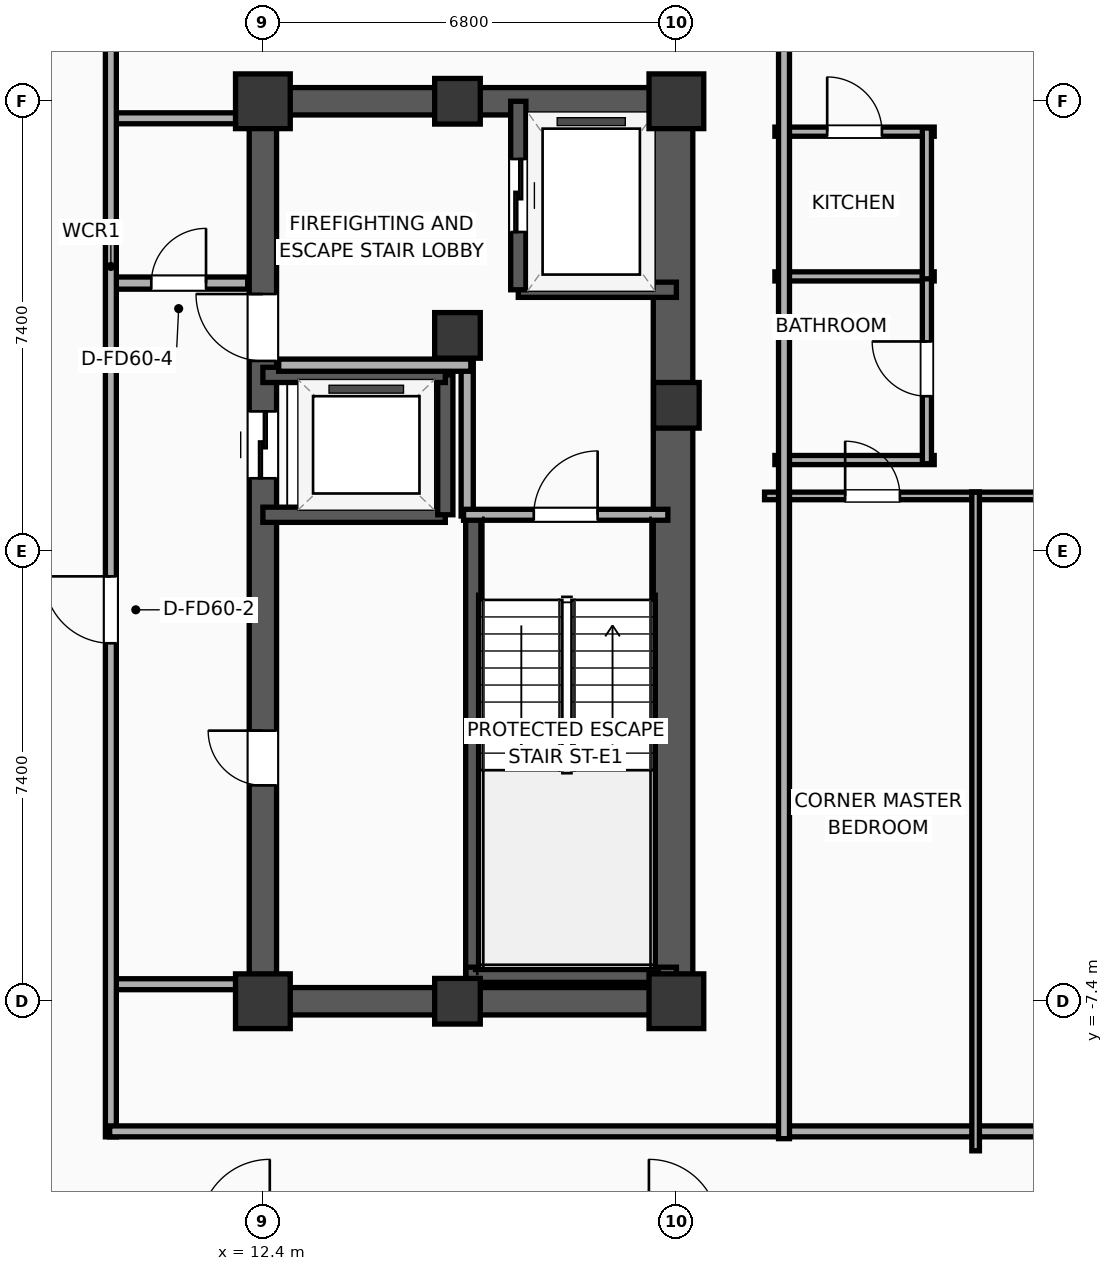
"""IFC4 building model, lengths in metres.
Left out: names, types, materials, properties, quantities, classifications, styles, units other than length and angle.
Written with IfcOpenShell. Run it as: python <this file> out.ifc"""

import sys

from ifc_helpers import new_model, si_unit, direction, frame, frame_2d, origin, origin_2d, place, context, subcontext, project, spatial, rectangle, extrude, element, fill, save


model = new_model("IFC4")
c1 = context("Model", 3, precision=1e-05, world=origin(), true_north=direction((0.0, 1.0)))
c2 = subcontext(c1, "Body", "Model", "MODEL_VIEW")
j1 = project(units=[si_unit("LENGTHUNIT", "METRE"), si_unit("PLANEANGLEUNIT", "RADIAN")], contexts=[c1])
p1 = place(None, origin())
s1 = spatial("IfcSite", under=j1, at=p1, CompositionType="ELEMENT")
p2 = place(p1, origin())
s2 = spatial("IfcBuilding", under=s1, at=p2, CompositionType="ELEMENT")
p3 = place(p2, frame((0.0, 0.0, 231.4)))
s3 = spatial("IfcBuildingStorey", under=s2, at=p3, CompositionType="ELEMENT", Elevation=231.4)
p4 = place(p3, frame((12.4, -7.4, 0.0), z_axis=(0.0, 0.0, 1.0), x_axis=(1.0, 0.0, 0.0)))
e1 = element("IfcColumn", 1, at=p4, inside=s3, PredefinedType="COLUMN", context=c2, shape_type="SweptSolid", body=[
    extrude(rectangle(XDim=0.9, YDim=0.9, at=origin_2d()), origin(), (0.0, 0.0, 1.0), 3.9),
])
p5 = place(p3, frame((15.6, 3.55, 0.0), z_axis=(0.0, 0.0, 1.0), x_axis=(1.0, 0.0, 0.0)))
e2 = element("IfcColumn", 2, at=p5, inside=s3, PredefinedType="COLUMN", context=c2, shape_type="SweptSolid", body=[
    extrude(rectangle(XDim=0.75, YDim=0.75, at=origin_2d()), origin(), (0.0, 0.0, 1.0), 3.9),
])
p6 = place(p3, frame((12.4, 7.4, 0.0), z_axis=(0.0, 0.0, 1.0), x_axis=(1.0, 0.0, 0.0)))
e3 = element("IfcColumn", 3, at=p6, inside=s3, PredefinedType="COLUMN", context=c2, shape_type="SweptSolid", body=[
    extrude(rectangle(XDim=0.9, YDim=0.9, at=origin_2d()), origin(), (0.0, 0.0, 1.0), 3.9),
])
for number, where, z_axis, x_axis in (
    (4, (15.6, -7.4, 0.0), (0.0, 0.0, 1.0), (1.0, 0.0, 0.0)),
    (5, (15.6, 7.4, 0.0), (0.0, 0.0, 1.0), (1.0, 0.0, 0.0)),
):
    element("IfcColumn", number, at=place(p3, frame(where, z_axis=z_axis, x_axis=x_axis)), inside=s3, PredefinedType="COLUMN", context=c2, shape_type="SweptSolid", body=[
        extrude(rectangle(XDim=0.75, YDim=0.75, at=origin_2d()), origin(), (0.0, 0.0, 1.0), 3.9),
    ])
p7 = place(p3, frame((19.2, -7.4, 0.0), z_axis=(0.0, 0.0, 1.0), x_axis=(1.0, 0.0, 0.0)))
e6 = element("IfcColumn", 6, at=p7, inside=s3, PredefinedType="COLUMN", context=c2, shape_type="SweptSolid", body=[
    extrude(rectangle(XDim=0.9, YDim=0.9, at=origin_2d()), origin(), (0.0, 0.0, 1.0), 3.9),
])
p8 = place(p3, frame((19.2, 2.4, 0.0), z_axis=(0.0, 0.0, 1.0), x_axis=(1.0, 0.0, 0.0)))
e7 = element("IfcColumn", 7, at=p8, inside=s3, PredefinedType="COLUMN", context=c2, shape_type="SweptSolid", body=[
    extrude(rectangle(XDim=0.75, YDim=0.75, at=origin_2d()), origin(), (0.0, 0.0, 1.0), 3.9),
])
p9 = place(p3, frame((19.2, 7.4, 0.0), z_axis=(0.0, 0.0, 1.0), x_axis=(1.0, 0.0, 0.0)))
e8 = element("IfcColumn", 8, at=p9, inside=s3, PredefinedType="COLUMN", context=c2, shape_type="SweptSolid", body=[
    extrude(rectangle(XDim=0.9, YDim=0.9, at=origin_2d()), origin(), (0.0, 0.0, 1.0), 3.9),
])
for number, where, z_axis, x_axis in (
    (9, (12.175, -7.4, 0.0), (0.0, 0.0, 1.0), (1.0, 0.0, 0.0)),
    (10, (12.175, 7.4, 0.0), (0.0, 0.0, 1.0), (1.0, 0.0, 0.0)),
):
    element("IfcWall", number, at=place(p3, frame(where, z_axis=z_axis, x_axis=x_axis)), inside=s3, PredefinedType="SHEAR", context=c2, shape_type="SweptSolid", body=[
        extrude(rectangle(XDim=7.25, YDim=0.45, at=frame_2d((3.625, 0.0))), origin(), (0.0, 0.0, 1.0), 3.65),
    ])
p10 = place(p3, frame((12.4, -7.4, 0.0), z_axis=(0.0, 0.0, 1.0), x_axis=(0.0, 1.0, 0.0)))
e11 = element("IfcWall", 11, at=p10, inside=s3, PredefinedType="SHEAR", context=c2, shape_type="SweptSolid", body=[
    extrude(rectangle(XDim=14.8, YDim=0.45, at=frame_2d((7.4, 0.0))), origin(), (0.0, 0.0, 1.0), 3.65),
])
p11 = place(p10, frame((8.6, 0.0, 0.0)))
e12 = element("IfcOpeningElement", 12, at=p11, cuts=e11, PredefinedType="OPENING", context=c2, shape_type="SweptSolid", body=[
    extrude(rectangle(XDim=1.1, YDim=2.05, at=frame_2d((0.55, 1.025))), frame((0.0, 0.235, 0.0), z_axis=(0.0, -1.0, 0.0), x_axis=(1.0, 0.0, 0.0)), (0.0, 0.0, 1.0), 0.47),
])
p12 = place(p10, frame((10.53, 0.0, 0.0)))
e13 = element("IfcOpeningElement", 13, at=p12, cuts=e11, PredefinedType="OPENING", context=c2, shape_type="SweptSolid", body=[
    extrude(rectangle(XDim=1.1, YDim=2.05, at=frame_2d((0.55, 1.025))), frame((0.0, 0.235, 0.0), z_axis=(0.0, -1.0, 0.0), x_axis=(1.0, 0.0, 0.0)), (0.0, 0.0, 1.0), 0.47),
])
p13 = place(p10, frame((3.55, 0.0, 0.0)))
e14 = element("IfcOpeningElement", 14, at=p13, cuts=e11, PredefinedType="OPENING", context=c2, shape_type="SweptSolid", body=[
    extrude(rectangle(XDim=0.9, YDim=2.05, at=frame_2d((0.45, 1.025))), frame((0.0, 0.235, 0.0), z_axis=(0.0, -1.0, 0.0), x_axis=(1.0, 0.0, 0.0)), (0.0, 0.0, 1.0), 0.47),
])
p14 = place(p3, frame((19.145, -7.4, 0.0), z_axis=(0.0, 0.0, 1.0), x_axis=(0.0, 1.0, 0.0)))
e15 = element("IfcWall", 15, at=p14, inside=s3, PredefinedType="SHEAR", context=c2, shape_type="SweptSolid", body=[
    extrude(rectangle(XDim=14.8, YDim=0.65, at=frame_2d((7.4, 0.0))), origin(), (0.0, 0.0, 1.0), 3.65),
])
p15 = place(p3, frame((15.86, -7.085, 0.0), z_axis=(0.0, 0.0, 1.0), x_axis=(0.0, 1.0, 0.0)))
e16 = element("IfcWall", 16, at=p15, inside=s3, PredefinedType="SOLIDWALL", context=c2, shape_type="SweptSolid", body=[
    extrude(rectangle(XDim=7.685, YDim=0.25, at=frame_2d((3.843, 0.0))), origin(), (0.0, 0.0, 1.0), 3.65),
])
p16 = place(p3, frame((15.74, -6.965, 0.0), z_axis=(0.0, 0.0, 1.0), x_axis=(1.0, 0.0, 0.0)))
e17 = element("IfcWall", 17, at=p16, inside=s3, PredefinedType="SOLIDWALL", context=c2, shape_type="SweptSolid", body=[
    extrude(rectangle(XDim=3.46, YDim=0.25, at=frame_2d((1.73, 0.0))), origin(), (0.0, 0.0, 1.0), 3.65),
])
p17 = place(p3, frame((16.6, 4.3, 0.0), z_axis=(0.0, 0.0, 1.0), x_axis=(1.0, 0.0, 0.0)))
e18 = element("IfcWall", 18, at=p17, inside=s3, PredefinedType="SOLIDWALL", context=c2, shape_type="SweptSolid", body=[
    extrude(rectangle(XDim=2.6, YDim=0.25, at=frame_2d((1.3, 0.0))), origin(), (0.0, 0.0, 1.0), 3.65),
])
p18 = place(p3, frame((16.6, 7.4, 0.0), z_axis=(0.0, 0.0, 1.0), x_axis=(0.0, -1.0, 0.0)))
e19 = element("IfcWall", 19, at=p18, inside=s3, PredefinedType="SOLIDWALL", context=c2, shape_type="SweptSolid", body=[
    extrude(rectangle(XDim=3.1, YDim=0.25, at=frame_2d((1.55, 0.0))), origin(), (0.0, 0.0, 1.0), 3.65),
])
p19 = place(p18, frame((0.95, 0.0, 0.0)))
e20 = element("IfcOpeningElement", 20, at=p19, cuts=e19, PredefinedType="OPENING", context=c2, shape_type="SweptSolid", body=[
    extrude(rectangle(XDim=1.2, YDim=2.05, at=frame_2d((0.6, 1.025))), frame((0.0, 0.135, 0.0), z_axis=(0.0, -1.0, 0.0), x_axis=(1.0, 0.0, 0.0)), (0.0, 0.0, 1.0), 0.27),
])
p20 = place(p3, frame((12.4, 0.6, 0.0), z_axis=(0.0, 0.0, 1.0), x_axis=(1.0, 0.0, 0.0)))
e21 = element("IfcWall", 21, at=p20, inside=s3, PredefinedType="SOLIDWALL", context=c2, shape_type="SweptSolid", body=[
    extrude(rectangle(XDim=3.0, YDim=0.25, at=frame_2d((1.5, 0.0))), origin(), (0.0, 0.0, 1.0), 3.65),
])
p21 = place(p3, frame((15.4, 0.6, 0.0), z_axis=(0.0, 0.0, 1.0), x_axis=(0.0, 1.0, 0.0)))
e22 = element("IfcWall", 22, at=p21, inside=s3, PredefinedType="SOLIDWALL", context=c2, shape_type="SweptSolid", body=[
    extrude(rectangle(XDim=2.3, YDim=0.25, at=frame_2d((1.15, 0.0))), origin(), (0.0, 0.0, 1.0), 3.65),
])
p22 = place(p3, frame((15.4, 2.9, 0.0), z_axis=(0.0, 0.0, 1.0), x_axis=(-1.0, 0.0, 0.0)))
e23 = element("IfcWall", 23, at=p22, inside=s3, PredefinedType="SOLIDWALL", context=c2, shape_type="SweptSolid", body=[
    extrude(rectangle(XDim=3.0, YDim=0.25, at=frame_2d((1.5, 0.0))), origin(), (0.0, 0.0, 1.0), 3.65),
])
p23 = place(p3, frame((15.76, 0.58, 0.0), z_axis=(0.0, 0.0, 1.0), x_axis=(0.0, 1.0, 0.0)))
e24 = element("IfcWall", 24, at=p23, inside=s3, PredefinedType="PARTITIONING", context=c2, shape_type="SweptSolid", body=[
    extrude(rectangle(XDim=2.52, YDim=0.2, at=frame_2d((1.26, 0.0))), origin(), (0.0, 0.0, 1.0), 3.65),
])
p24 = place(p3, frame((12.66, 3.06, 0.0), z_axis=(0.0, 0.0, 1.0), x_axis=(1.0, 0.0, 0.0)))
e25 = element("IfcWall", 25, at=p24, inside=s3, PredefinedType="PARTITIONING", context=c2, shape_type="SweptSolid", body=[
    extrude(rectangle(XDim=3.16, YDim=0.2, at=frame_2d((1.58, 0.0))), origin(), (0.0, 0.0, 1.0), 3.65),
])
p25 = place(p3, frame((15.7, 0.6, 0.0), z_axis=(0.0, 0.0, 1.0), x_axis=(1.0, 0.0, 0.0)))
e26 = element("IfcWall", 26, at=p25, inside=s3, PredefinedType="PARTITIONING", context=c2, shape_type="SweptSolid", body=[
    extrude(rectangle(XDim=3.36, YDim=0.18, at=frame_2d((1.68, 0.0))), origin(), (0.0, 0.0, 1.0), 3.65),
])
p26 = place(p25, frame((1.155, 0.0, 0.0)))
e27 = element("IfcOpeningElement", 27, at=p26, cuts=e26, PredefinedType="OPENING", context=c2, shape_type="SweptSolid", body=[
    extrude(rectangle(XDim=1.05, YDim=2.05, at=frame_2d((0.525, 1.025))), frame((0.0, 0.1, 0.0), z_axis=(0.0, -1.0, 0.0), x_axis=(1.0, 0.0, 0.0)), (0.0, 0.0, 1.0), 0.2),
])
p27 = place(p3, frame((9.88, 4.41, 0.0), z_axis=(0.0, 0.0, 1.0), x_axis=(1.0, 0.0, 0.0)))
e28 = element("IfcWall", 28, at=p27, inside=s3, PredefinedType="PARTITIONING", context=c2, shape_type="SweptSolid", body=[
    extrude(rectangle(XDim=2.27, YDim=0.2, at=frame_2d((1.135, 0.0))), origin(), (0.0, 0.0, 1.0), 3.65),
])
p28 = place(p27, frame((0.685, 0.0, 0.0)))
e29 = element("IfcOpeningElement", 29, at=p28, cuts=e28, PredefinedType="OPENING", context=c2, shape_type="SweptSolid", body=[
    extrude(rectangle(XDim=0.9, YDim=2.05, at=frame_2d((0.45, 1.025))), frame((0.0, 0.11, 0.0), z_axis=(0.0, -1.0, 0.0), x_axis=(1.0, 0.0, 0.0)), (0.0, 0.0, 1.0), 0.22),
])
for number, where, z_axis, x_axis in (
    (30, (9.88, 7.12, 0.0), (0.0, 0.0, 1.0), (1.0, 0.0, 0.0)),
    (31, (9.88, -7.12, 0.0), (0.0, 0.0, 1.0), (1.0, 0.0, 0.0)),
):
    element("IfcWall", number, at=place(p3, frame(where, z_axis=z_axis, x_axis=x_axis)), inside=s3, PredefinedType="PARTITIONING", context=c2, shape_type="SweptSolid", body=[
        extrude(rectangle(XDim=2.27, YDim=0.18, at=frame_2d((1.135, 0.0))), origin(), (0.0, 0.0, 1.0), 3.65),
    ])
p29 = place(p3, frame((9.9, -9.63, 0.0), z_axis=(0.0, 0.0, 1.0), x_axis=(0.0, 1.0, 0.0)))
e32 = element("IfcWall", 32, at=p29, inside=s3, PredefinedType="PARTITIONING", context=c2, shape_type="SweptSolid", body=[
    extrude(rectangle(XDim=19.26, YDim=0.18, at=frame_2d((9.63, 0.0))), origin(), (0.0, 0.0, 1.0), 3.65),
])
p30 = place(p29, frame((8.117, 0.0, 0.0)))
e33 = element("IfcOpeningElement", 33, at=p30, cuts=e32, PredefinedType="OPENING", context=c2, shape_type="SweptSolid", body=[
    extrude(rectangle(XDim=1.1, YDim=2.05, at=frame_2d((0.55, 1.025))), frame((0.0, 0.1, 0.0), z_axis=(0.0, -1.0, 0.0), x_axis=(1.0, 0.0, 0.0)), (0.0, 0.0, 1.0), 0.2),
])
p31 = place(p3, frame((9.88, -9.54, 0.0), z_axis=(0.0, 0.0, 1.0), x_axis=(1.0, 0.0, 0.0)))
e34 = element("IfcWall", 34, at=p31, inside=s3, PredefinedType="PARTITIONING", context=c2, shape_type="SweptSolid", body=[
    extrude(rectangle(XDim=20.35, YDim=0.18, at=frame_2d((10.175, 0.0))), origin(), (0.0, 0.0, 1.0), 3.65),
])
p32 = place(p3, frame((20.82, 6.9, 0.0), z_axis=(0.0, 0.0, 1.0), x_axis=(1.0, 0.0, 0.0)))
e35 = element("IfcWall", 35, at=p32, inside=s3, PredefinedType="PLUMBINGWALL", context=c2, shape_type="SweptSolid", body=[
    extrude(rectangle(XDim=2.62, YDim=0.15, at=frame_2d((1.31, 0.0))), origin(), (0.0, 0.0, 1.0), 3.65),
])
p33 = place(p32, frame((0.86, 0.0, 0.0)))
e36 = element("IfcOpeningElement", 36, at=p33, cuts=e35, PredefinedType="OPENING", context=c2, shape_type="SweptSolid", body=[
    extrude(rectangle(XDim=0.9, YDim=2.05, at=frame_2d((0.45, 1.025))), frame((0.0, 0.085, 0.0), z_axis=(0.0, -1.0, 0.0), x_axis=(1.0, 0.0, 0.0)), (0.0, 0.0, 1.0), 0.17),
])
for number, where, z_axis, x_axis in (
    (37, (20.82, 4.52, 0.0), (0.0, 0.0, 1.0), (1.0, 0.0, 0.0)),
    (38, (20.82, 1.5, 0.0), (0.0, 0.0, 1.0), (1.0, 0.0, 0.0)),
):
    element("IfcWall", number, at=place(p3, frame(where, z_axis=z_axis, x_axis=x_axis)), inside=s3, PredefinedType="PLUMBINGWALL", context=c2, shape_type="SweptSolid", body=[
        extrude(rectangle(XDim=2.62, YDim=0.15, at=frame_2d((1.31, 0.0))), origin(), (0.0, 0.0, 1.0), 3.65),
    ])
p34 = place(p3, frame((23.32, 1.44, 0.0), z_axis=(0.0, 0.0, 1.0), x_axis=(0.0, 1.0, 0.0)))
e39 = element("IfcWall", 39, at=p34, inside=s3, PredefinedType="PLUMBINGWALL", context=c2, shape_type="SweptSolid", body=[
    extrude(rectangle(XDim=3.12, YDim=0.15, at=frame_2d((1.56, 0.0))), origin(), (0.0, 0.0, 1.0), 3.65),
])
p35 = place(p34, frame((1.11, 0.0, 0.0)))
e40 = element("IfcOpeningElement", 40, at=p35, cuts=e39, PredefinedType="OPENING", context=c2, shape_type="SweptSolid", body=[
    extrude(rectangle(XDim=0.9, YDim=2.05, at=frame_2d((0.45, 1.025))), frame((0.0, 0.085, 0.0), z_axis=(0.0, -1.0, 0.0), x_axis=(1.0, 0.0, 0.0)), (0.0, 0.0, 1.0), 0.17),
])
p36 = place(p3, frame((23.32, 4.48, 0.0), z_axis=(0.0, 0.0, 1.0), x_axis=(0.0, 1.0, 0.0)))
e41 = element("IfcWall", 41, at=p36, inside=s3, PredefinedType="PLUMBINGWALL", context=c2, shape_type="SweptSolid", body=[
    extrude(rectangle(XDim=2.48, YDim=0.15, at=frame_2d((1.24, 0.0))), origin(), (0.0, 0.0, 1.0), 3.65),
])
p37 = place(p3, frame((20.65, 0.91, 0.0), z_axis=(0.0, 0.0, 1.0), x_axis=(1.0, 0.0, 0.0)))
e42 = element("IfcWall", 42, at=p37, inside=s3, PredefinedType="PARTITIONING", context=c2, shape_type="SweptSolid", body=[
    extrude(rectangle(XDim=3.534, YDim=0.125, at=frame_2d((1.767, 0.0))), origin(), (0.0, 0.0, 1.0), 3.65),
])
p38 = place(p37, frame((1.325, 0.0, 0.0)))
e43 = element("IfcOpeningElement", 43, at=p38, cuts=e42, PredefinedType="OPENING", context=c2, shape_type="SweptSolid", body=[
    extrude(rectangle(XDim=0.9, YDim=2.05, at=frame_2d((0.45, 1.025))), frame((0.0, 0.073, 0.0), z_axis=(0.0, -1.0, 0.0), x_axis=(1.0, 0.0, 0.0)), (0.0, 0.0, 1.0), 0.145),
])
p39 = place(p3, frame((24.059, 0.91, 0.0), z_axis=(0.0, 0.0, 1.0), x_axis=(1.0, 0.0, 0.0)))
e44 = element("IfcWall", 44, at=p39, inside=s3, PredefinedType="PARTITIONING", context=c2, shape_type="SweptSolid", body=[
    extrude(rectangle(XDim=3.183, YDim=0.125, at=frame_2d((1.591, 0.0))), origin(), (0.0, 0.0, 1.0), 3.65),
])
p40 = place(p39, frame((1.142, 0.0, 0.0)))
e45 = element("IfcOpeningElement", 45, at=p40, cuts=e44, PredefinedType="OPENING", context=c2, shape_type="SweptSolid", body=[
    extrude(rectangle(XDim=0.9, YDim=2.05, at=frame_2d((0.45, 1.025))), frame((0.0, 0.073, 0.0), z_axis=(0.0, -1.0, 0.0), x_axis=(1.0, 0.0, 0.0)), (0.0, 0.0, 1.0), 0.145),
])
p41 = place(p3, frame((24.121, -9.86, 0.0), z_axis=(0.0, 0.0, 1.0), x_axis=(0.0, 1.0, 0.0)))
e46 = element("IfcWall", 46, at=p41, inside=s3, PredefinedType="PARTITIONING", context=c2, shape_type="SweptSolid", body=[
    extrude(rectangle(XDim=10.83, YDim=0.125, at=frame_2d((5.415, 0.0))), origin(), (0.0, 0.0, 1.0), 3.65),
])
p42 = place(p3, frame((20.97, -9.66, 0.0), z_axis=(0.0, 0.0, 1.0), x_axis=(0.0, 1.0, 0.0)))
e47 = element("IfcWall", 47, at=p42, inside=s3, PredefinedType="PARTITIONING", context=c2, shape_type="SweptSolid", body=[
    extrude(rectangle(XDim=19.32, YDim=0.18, at=frame_2d((9.66, 0.0))), origin(), (0.0, 0.0, 1.0), 3.65),
])
p43 = place(p19, origin())
e48 = element("IfcDoor", 48, at=p43, inside=s3, OperationType="SLIDING_TO_LEFT", PredefinedType="DOOR", context=c2, shape_type="SweptSolid", body=[
    extrude(rectangle(XDim=1.2, YDim=2.05, at=frame_2d((0.6, 1.025))), frame((0.0, 0.025, 0.0), z_axis=(0.0, -1.0, 0.0), x_axis=(1.0, 0.0, 0.0)), (0.0, 0.0, 1.0), 0.05),
])
fill(e20, e48)
p44 = place(p11, origin())
e49 = element("IfcDoor", 49, at=p44, inside=s3, OperationType="SLIDING_TO_LEFT", PredefinedType="DOOR", context=c2, shape_type="SweptSolid", body=[
    extrude(rectangle(XDim=1.1, YDim=2.05, at=frame_2d((0.55, 1.025))), frame((0.0, 0.025, 0.0), z_axis=(0.0, -1.0, 0.0), x_axis=(1.0, 0.0, 0.0)), (0.0, 0.0, 1.0), 0.05),
])
fill(e12, e49)
p45 = place(p26, origin())
e50 = element("IfcDoor", 50, at=p45, inside=s3, OperationType="SINGLE_SWING_RIGHT", PredefinedType="DOOR", context=c2, shape_type="SweptSolid", body=[
    extrude(rectangle(XDim=1.05, YDim=2.05, at=frame_2d((0.525, 1.025))), frame((0.0, 0.025, 0.0), z_axis=(0.0, -1.0, 0.0), x_axis=(1.0, 0.0, 0.0)), (0.0, 0.0, 1.0), 0.05),
])
fill(e27, e50)
p46 = place(p28, origin())
e51 = element("IfcDoor", 51, at=p46, inside=s3, OperationType="SINGLE_SWING_RIGHT", PredefinedType="DOOR", context=c2, shape_type="SweptSolid", body=[
    extrude(rectangle(XDim=0.9, YDim=2.05, at=frame_2d((0.45, 1.025))), frame((0.0, 0.025, 0.0), z_axis=(0.0, -1.0, 0.0), x_axis=(1.0, 0.0, 0.0)), (0.0, 0.0, 1.0), 0.05),
])
fill(e29, e51)
p47 = place(p30, origin())
e52 = element("IfcDoor", 52, at=p47, inside=s3, OperationType="SINGLE_SWING_RIGHT", PredefinedType="DOOR", context=c2, shape_type="SweptSolid", body=[
    extrude(rectangle(XDim=1.1, YDim=2.05, at=frame_2d((0.55, 1.025))), frame((0.0, 0.025, 0.0), z_axis=(0.0, -1.0, 0.0), x_axis=(1.0, 0.0, 0.0)), (0.0, 0.0, 1.0), 0.05),
])
fill(e33, e52)
p48 = place(p33, origin())
e53 = element("IfcDoor", 53, at=p48, inside=s3, OperationType="SINGLE_SWING_LEFT", PredefinedType="DOOR", context=c2, shape_type="SweptSolid", body=[
    extrude(rectangle(XDim=0.9, YDim=2.05, at=frame_2d((0.45, 1.025))), frame((0.0, 0.025, 0.0), z_axis=(0.0, -1.0, 0.0), x_axis=(1.0, 0.0, 0.0)), (0.0, 0.0, 1.0), 0.05),
])
fill(e36, e53)
p49 = place(p35, origin())
e54 = element("IfcDoor", 54, at=p49, inside=s3, OperationType="SINGLE_SWING_RIGHT", PredefinedType="DOOR", context=c2, shape_type="SweptSolid", body=[
    extrude(rectangle(XDim=0.9, YDim=2.05, at=frame_2d((0.45, 1.025))), frame((0.0, 0.025, 0.0), z_axis=(0.0, -1.0, 0.0), x_axis=(1.0, 0.0, 0.0)), (0.0, 0.0, 1.0), 0.05),
])
fill(e40, e54)
p50 = place(p38, origin())
e55 = element("IfcDoor", 55, at=p50, inside=s3, OperationType="SINGLE_SWING_LEFT", PredefinedType="DOOR", context=c2, shape_type="SweptSolid", body=[
    extrude(rectangle(XDim=0.9, YDim=2.05, at=frame_2d((0.45, 1.025))), frame((0.0, 0.025, 0.0), z_axis=(0.0, -1.0, 0.0), x_axis=(1.0, 0.0, 0.0)), (0.0, 0.0, 1.0), 0.05),
])
fill(e43, e55)
p51 = place(p12, origin())
e56 = element("IfcDoor", 56, at=p51, inside=s3, OperationType="SINGLE_SWING_RIGHT", PredefinedType="DOOR", context=c2, shape_type="SweptSolid", body=[
    extrude(rectangle(XDim=1.1, YDim=2.05, at=frame_2d((0.55, 1.025))), frame((0.0, 0.025, 0.0), z_axis=(0.0, -1.0, 0.0), x_axis=(1.0, 0.0, 0.0)), (0.0, 0.0, 1.0), 0.05),
])
fill(e13, e56)
p52 = place(p13, origin())
e57 = element("IfcDoor", 57, at=p52, inside=s3, OperationType="SINGLE_SWING_RIGHT", PredefinedType="DOOR", context=c2, shape_type="SweptSolid", body=[
    extrude(rectangle(XDim=0.9, YDim=2.05, at=frame_2d((0.45, 1.025))), frame((0.0, 0.025, 0.0), z_axis=(0.0, -1.0, 0.0), x_axis=(1.0, 0.0, 0.0)), (0.0, 0.0, 1.0), 0.05),
])
fill(e14, e57)
save(model, sys.argv[1])
